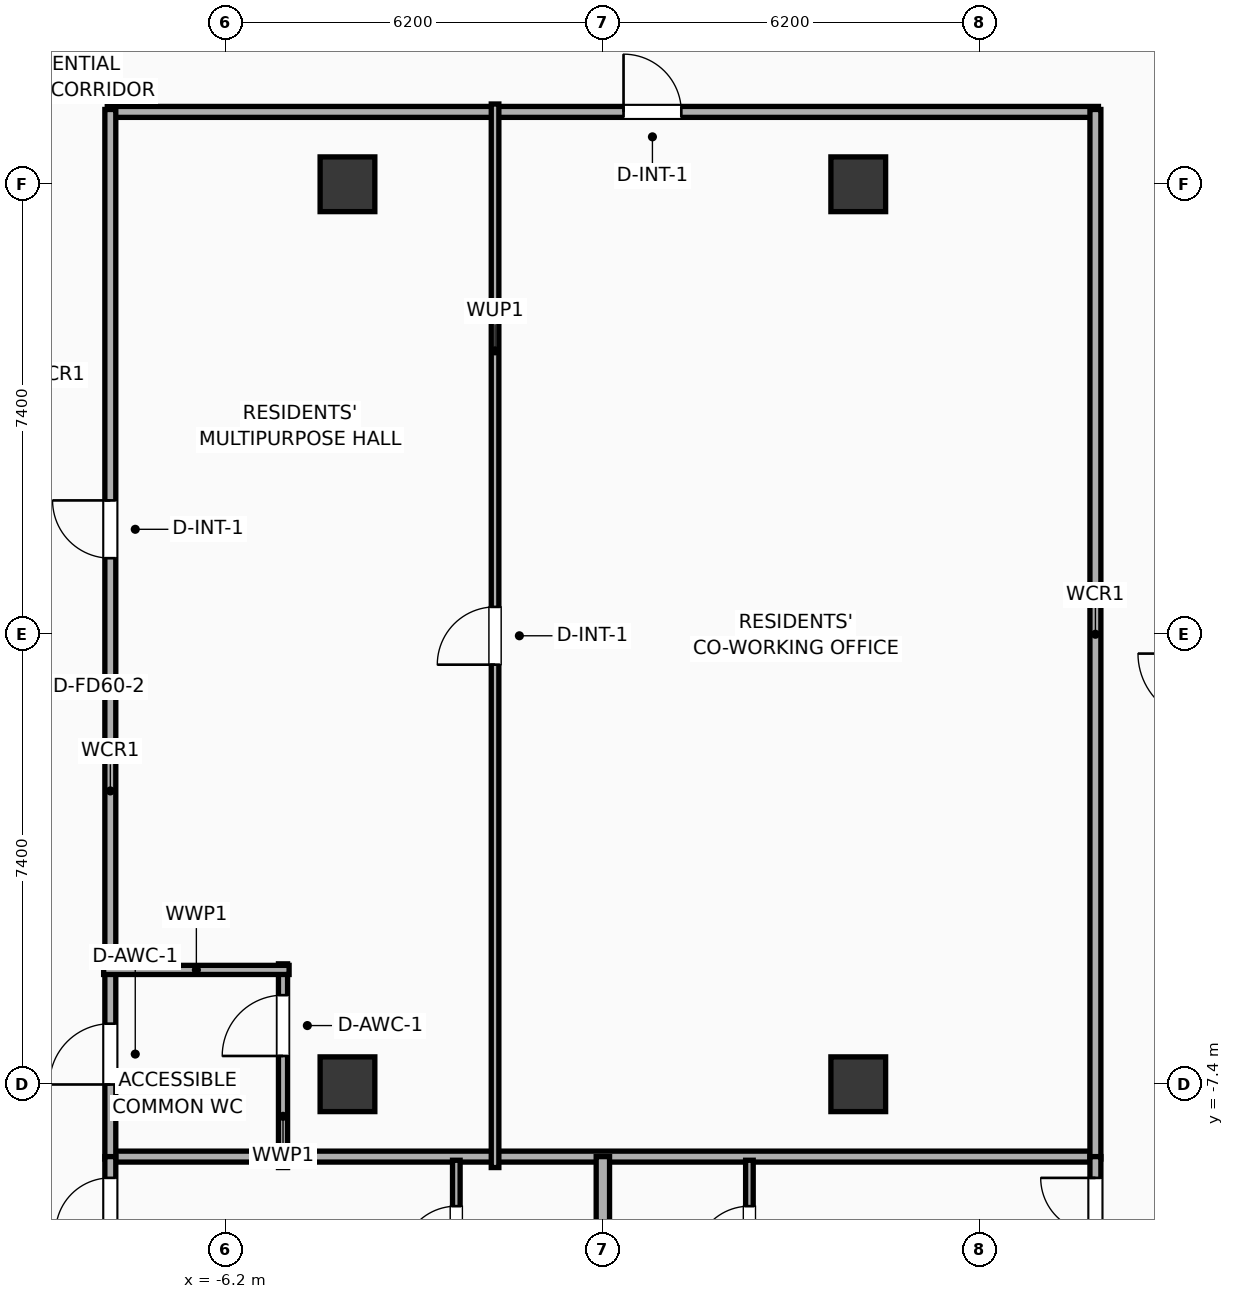
"""IFC4 building model, lengths in metres.
Left out: names, types, materials, properties, quantities, classifications, styles, units other than length and angle.
Written with IfcOpenShell. Run it as: python <this file> out.ifc"""

import sys

from ifc_helpers import new_model, si_unit, direction, frame, frame_2d, origin, origin_2d, place, context, subcontext, project, spatial, rectangle, extrude, element, fill, save


model = new_model("IFC4")
c1 = context("Model", 3, precision=1e-05, world=origin(), true_north=direction((0.0, 1.0)))
c2 = subcontext(c1, "Body", "Model", "MODEL_VIEW")
j1 = project(units=[si_unit("LENGTHUNIT", "METRE"), si_unit("PLANEANGLEUNIT", "RADIAN")], contexts=[c1])
p1 = place(None, origin())
s1 = spatial("IfcSite", under=j1, at=p1, CompositionType="ELEMENT")
p2 = place(p1, origin())
s2 = spatial("IfcBuilding", under=s1, at=p2, CompositionType="ELEMENT")
p3 = place(p2, frame((0.0, 0.0, 295.1)))
s3 = spatial("IfcBuildingStorey", under=s2, at=p3, CompositionType="ELEMENT", Elevation=295.1)
for number, where, z_axis, x_axis in (
    (1, (-4.2, -7.4, 0.0), (0.0, 0.0, 1.0), (1.0, 0.0, 0.0)),
    (2, (-4.2, 7.4, 0.0), (0.0, 0.0, 1.0), (1.0, 0.0, 0.0)),
    (3, (4.2, -7.4, 0.0), (0.0, 0.0, 1.0), (1.0, 0.0, 0.0)),
    (4, (4.2, 7.4, 0.0), (0.0, 0.0, 1.0), (1.0, 0.0, 0.0)),
):
    element("IfcColumn", number, at=place(p3, frame(where, z_axis=z_axis, x_axis=x_axis)), inside=s3, PredefinedType="COLUMN", context=c2, shape_type="SweptSolid", body=[
        extrude(rectangle(XDim=0.9, YDim=0.9, at=origin_2d()), origin(), (0.0, 0.0, 1.0), 3.9),
    ])
p4 = place(p3, frame((-8.15, 8.59, 0.0), z_axis=(0.0, 0.0, 1.0), x_axis=(1.0, 0.0, 0.0)))
e5 = element("IfcWall", 5, at=p4, inside=s3, PredefinedType="PARTITIONING", context=c2, shape_type="SweptSolid", body=[
    extrude(rectangle(XDim=16.3, YDim=0.18, at=frame_2d((8.15, 0.0))), origin(), (0.0, 0.0, 1.0), 3.635),
])
p5 = place(p4, frame((8.49, 0.0, 0.0)))
e6 = element("IfcOpeningElement", 6, at=p5, cuts=e5, PredefinedType="OPENING", context=c2, shape_type="SweptSolid", body=[
    extrude(rectangle(XDim=0.95, YDim=2.05, at=frame_2d((0.475, 1.025))), frame((0.0, 0.1, 0.0), z_axis=(0.0, -1.0, 0.0), x_axis=(1.0, 0.0, 0.0)), (0.0, 0.0, 1.0), 0.2),
])
p6 = place(p3, frame((-8.15, -8.59, 0.0), z_axis=(0.0, 0.0, 1.0), x_axis=(1.0, 0.0, 0.0)))
e7 = element("IfcWall", 7, at=p6, inside=s3, PredefinedType="PARTITIONING", context=c2, shape_type="SweptSolid", body=[
    extrude(rectangle(XDim=16.3, YDim=0.18, at=frame_2d((8.15, 0.0))), origin(), (0.0, 0.0, 1.0), 3.635),
])
p7 = place(p3, frame((-8.1, -8.63, 0.0), z_axis=(0.0, 0.0, 1.0), x_axis=(0.0, 1.0, 0.0)))
e8 = element("IfcWall", 8, at=p7, inside=s3, PredefinedType="PARTITIONING", context=c2, shape_type="SweptSolid", body=[
    extrude(rectangle(XDim=17.26, YDim=0.18, at=frame_2d((8.63, 0.0))), origin(), (0.0, 0.0, 1.0), 3.635),
])
p8 = place(p7, frame((1.226, 0.0, 0.0)))
e9 = element("IfcOpeningElement", 9, at=p8, cuts=e8, PredefinedType="OPENING", context=c2, shape_type="SweptSolid", body=[
    extrude(rectangle(XDim=1.0, YDim=2.05, at=frame_2d((0.5, 1.025))), frame((0.0, 0.1, 0.0), z_axis=(0.0, -1.0, 0.0), x_axis=(1.0, 0.0, 0.0)), (0.0, 0.0, 1.0), 0.2),
])
p9 = place(p7, frame((9.881, 0.0, 0.0)))
e10 = element("IfcOpeningElement", 10, at=p9, cuts=e8, PredefinedType="OPENING", context=c2, shape_type="SweptSolid", body=[
    extrude(rectangle(XDim=0.95, YDim=2.05, at=frame_2d((0.475, 1.025))), frame((0.0, 0.1, 0.0), z_axis=(0.0, -1.0, 0.0), x_axis=(1.0, 0.0, 0.0)), (0.0, 0.0, 1.0), 0.2),
])
p10 = place(p3, frame((8.1, -8.63, 0.0), z_axis=(0.0, 0.0, 1.0), x_axis=(0.0, 1.0, 0.0)))
e11 = element("IfcWall", 11, at=p10, inside=s3, PredefinedType="PARTITIONING", context=c2, shape_type="SweptSolid", body=[
    extrude(rectangle(XDim=17.26, YDim=0.18, at=frame_2d((8.63, 0.0))), origin(), (0.0, 0.0, 1.0), 3.635),
])
p11 = place(p3, frame((-5.26, -8.77, 0.0), z_axis=(0.0, 0.0, 1.0), x_axis=(0.0, 1.0, 0.0)))
e12 = element("IfcWall", 12, at=p11, inside=s3, PredefinedType="PLUMBINGWALL", context=c2, shape_type="SweptSolid", body=[
    extrude(rectangle(XDim=3.35, YDim=0.15, at=frame_2d((1.675, 0.0))), origin(), (0.0, 0.0, 1.0), 3.635),
])
p12 = place(p11, frame((1.835, 0.0, 0.0)))
e13 = element("IfcOpeningElement", 13, at=p12, cuts=e12, PredefinedType="OPENING", context=c2, shape_type="SweptSolid", body=[
    extrude(rectangle(XDim=1.0, YDim=2.05, at=frame_2d((0.5, 1.025))), frame((0.0, 0.085, 0.0), z_axis=(0.0, -1.0, 0.0), x_axis=(1.0, 0.0, 0.0)), (0.0, 0.0, 1.0), 0.17),
])
p13 = place(p3, frame((-8.21, -5.52, 0.0), z_axis=(0.0, 0.0, 1.0), x_axis=(1.0, 0.0, 0.0)))
e14 = element("IfcWall", 14, at=p13, inside=s3, PredefinedType="PLUMBINGWALL", context=c2, shape_type="SweptSolid", body=[
    extrude(rectangle(XDim=3.05, YDim=0.15, at=frame_2d((1.525, 0.0))), origin(), (0.0, 0.0, 1.0), 3.635),
])
p14 = place(p3, frame((-1.773, -8.77, 0.0), z_axis=(0.0, 0.0, 1.0), x_axis=(0.0, 1.0, 0.0)))
e15 = element("IfcWall", 15, at=p14, inside=s3, PredefinedType="PARTITIONING", context=c2, shape_type="SweptSolid", body=[
    extrude(rectangle(XDim=17.49, YDim=0.125, at=frame_2d((8.745, 0.0))), origin(), (0.0, 0.0, 1.0), 3.635),
])
p15 = place(p14, frame((8.27, 0.0, 0.0)))
e16 = element("IfcOpeningElement", 16, at=p15, cuts=e15, PredefinedType="OPENING", context=c2, shape_type="SweptSolid", body=[
    extrude(rectangle(XDim=0.95, YDim=2.05, at=frame_2d((0.475, 1.025))), frame((0.0, 0.073, 0.0), z_axis=(0.0, -1.0, 0.0), x_axis=(1.0, 0.0, 0.0)), (0.0, 0.0, 1.0), 0.145),
])
p16 = place(p3, frame((-2.41, -11.06, 0.0), z_axis=(0.0, 0.0, 1.0), x_axis=(0.0, 1.0, 0.0)))
e17 = element("IfcWall", 17, at=p16, inside=s3, PredefinedType="PARTITIONING", context=c2, shape_type="SweptSolid", body=[
    extrude(rectangle(XDim=2.41, YDim=0.125, at=frame_2d((1.205, 0.0))), origin(), (0.0, 0.0, 1.0), 3.635),
])
p17 = place(p16, frame((0.755, 0.0, 0.0)))
e18 = element("IfcOpeningElement", 18, at=p17, cuts=e17, PredefinedType="OPENING", context=c2, shape_type="SweptSolid", body=[
    extrude(rectangle(XDim=0.9, YDim=2.05, at=frame_2d((0.45, 1.025))), frame((0.0, 0.073, 0.0), z_axis=(0.0, -1.0, 0.0), x_axis=(1.0, 0.0, 0.0)), (0.0, 0.0, 1.0), 0.145),
])
p18 = place(p3, frame((-8.1, -18.155, 0.0), z_axis=(0.0, 0.0, 1.0), x_axis=(0.0, 1.0, 0.0)))
e19 = element("IfcWall", 19, at=p18, inside=s3, PredefinedType="PARTITIONING", context=c2, shape_type="SweptSolid", body=[
    extrude(rectangle(XDim=9.564, YDim=0.18, at=frame_2d((4.782, 0.0))), origin(), (0.0, 0.0, 1.0), 3.635),
])
p19 = place(p18, frame((8.315, 0.0, 0.0)))
e20 = element("IfcOpeningElement", 20, at=p19, cuts=e19, PredefinedType="OPENING", context=c2, shape_type="SweptSolid", body=[
    extrude(rectangle(XDim=0.9, YDim=2.05, at=frame_2d((0.45, 1.025))), frame((0.0, 0.1, 0.0), z_axis=(0.0, -1.0, 0.0), x_axis=(1.0, 0.0, 0.0)), (0.0, 0.0, 1.0), 0.2),
])
p20 = place(p3, frame((2.41, -11.06, 0.0), z_axis=(0.0, 0.0, 1.0), x_axis=(0.0, 1.0, 0.0)))
e21 = element("IfcWall", 21, at=p20, inside=s3, PredefinedType="PARTITIONING", context=c2, shape_type="SweptSolid", body=[
    extrude(rectangle(XDim=2.41, YDim=0.125, at=frame_2d((1.205, 0.0))), origin(), (0.0, 0.0, 1.0), 3.635),
])
p21 = place(p20, frame((0.755, 0.0, 0.0)))
e22 = element("IfcOpeningElement", 22, at=p21, cuts=e21, PredefinedType="OPENING", context=c2, shape_type="SweptSolid", body=[
    extrude(rectangle(XDim=0.9, YDim=2.05, at=frame_2d((0.45, 1.025))), frame((0.0, 0.073, 0.0), z_axis=(0.0, -1.0, 0.0), x_axis=(1.0, 0.0, 0.0)), (0.0, 0.0, 1.0), 0.145),
])
p22 = place(p3, frame((8.1, -19.857, 0.0), z_axis=(0.0, 0.0, 1.0), x_axis=(0.0, 1.0, 0.0)))
e23 = element("IfcWall", 23, at=p22, inside=s3, PredefinedType="PARTITIONING", context=c2, shape_type="SweptSolid", body=[
    extrude(rectangle(XDim=11.267, YDim=0.18, at=frame_2d((5.634, 0.0))), origin(), (0.0, 0.0, 1.0), 3.635),
])
p23 = place(p22, frame((10.017, 0.0, 0.0)))
e24 = element("IfcOpeningElement", 24, at=p23, cuts=e23, PredefinedType="OPENING", context=c2, shape_type="SweptSolid", body=[
    extrude(rectangle(XDim=0.9, YDim=2.05, at=frame_2d((0.45, 1.025))), frame((0.0, 0.1, 0.0), z_axis=(0.0, -1.0, 0.0), x_axis=(1.0, 0.0, 0.0)), (0.0, 0.0, 1.0), 0.2),
])
p24 = place(p3, frame((0.0, -19.006, 0.0), z_axis=(0.0, 0.0, 1.0), x_axis=(0.0, 1.0, 0.0)))
e25 = element("IfcWall", 25, at=p24, inside=s3, PredefinedType="PARTITIONING", context=c2, shape_type="SweptSolid", body=[
    extrude(rectangle(XDim=10.416, YDim=0.22, at=frame_2d((5.208, 0.0))), origin(), (0.0, 0.0, 1.0), 3.635),
])
p25 = place(p5, origin())
e26 = element("IfcDoor", 26, at=p25, inside=s3, OperationType="SINGLE_SWING_LEFT", PredefinedType="DOOR", context=c2, shape_type="SweptSolid", body=[
    extrude(rectangle(XDim=0.95, YDim=2.05, at=frame_2d((0.475, 1.025))), frame((0.0, 0.025, 0.0), z_axis=(0.0, -1.0, 0.0), x_axis=(1.0, 0.0, 0.0)), (0.0, 0.0, 1.0), 0.05),
])
fill(e6, e26)
p26 = place(p8, origin())
e27 = element("IfcDoor", 27, at=p26, inside=s3, OperationType="SINGLE_SWING_LEFT", PredefinedType="DOOR", context=c2, shape_type="SweptSolid", body=[
    extrude(rectangle(XDim=1.0, YDim=2.05, at=frame_2d((0.5, 1.025))), frame((0.0, 0.025, 0.0), z_axis=(0.0, -1.0, 0.0), x_axis=(1.0, 0.0, 0.0)), (0.0, 0.0, 1.0), 0.05),
])
fill(e9, e27)
p27 = place(p9, origin())
e28 = element("IfcDoor", 28, at=p27, inside=s3, OperationType="SINGLE_SWING_RIGHT", PredefinedType="DOOR", context=c2, shape_type="SweptSolid", body=[
    extrude(rectangle(XDim=0.95, YDim=2.05, at=frame_2d((0.475, 1.025))), frame((0.0, 0.025, 0.0), z_axis=(0.0, -1.0, 0.0), x_axis=(1.0, 0.0, 0.0)), (0.0, 0.0, 1.0), 0.05),
])
fill(e10, e28)
p28 = place(p12, origin())
e29 = element("IfcDoor", 29, at=p28, inside=s3, OperationType="SINGLE_SWING_LEFT", PredefinedType="DOOR", context=c2, shape_type="SweptSolid", body=[
    extrude(rectangle(XDim=1.0, YDim=2.05, at=frame_2d((0.5, 1.025))), frame((0.0, 0.025, 0.0), z_axis=(0.0, -1.0, 0.0), x_axis=(1.0, 0.0, 0.0)), (0.0, 0.0, 1.0), 0.05),
])
fill(e13, e29)
p29 = place(p15, origin())
e30 = element("IfcDoor", 30, at=p29, inside=s3, OperationType="SINGLE_SWING_LEFT", PredefinedType="DOOR", context=c2, shape_type="SweptSolid", body=[
    extrude(rectangle(XDim=0.95, YDim=2.05, at=frame_2d((0.475, 1.025))), frame((0.0, 0.025, 0.0), z_axis=(0.0, -1.0, 0.0), x_axis=(1.0, 0.0, 0.0)), (0.0, 0.0, 1.0), 0.05),
])
fill(e16, e30)
p30 = place(p17, origin())
e31 = element("IfcDoor", 31, at=p30, inside=s3, OperationType="SINGLE_SWING_LEFT", PredefinedType="DOOR", context=c2, shape_type="SweptSolid", body=[
    extrude(rectangle(XDim=0.9, YDim=2.05, at=frame_2d((0.45, 1.025))), frame((0.0, 0.025, 0.0), z_axis=(0.0, -1.0, 0.0), x_axis=(1.0, 0.0, 0.0)), (0.0, 0.0, 1.0), 0.05),
])
fill(e18, e31)
p31 = place(p19, origin())
e32 = element("IfcDoor", 32, at=p31, inside=s3, OperationType="SINGLE_SWING_LEFT", PredefinedType="DOOR", context=c2, shape_type="SweptSolid", body=[
    extrude(rectangle(XDim=0.9, YDim=2.05, at=frame_2d((0.45, 1.025))), frame((0.0, 0.025, 0.0), z_axis=(0.0, -1.0, 0.0), x_axis=(1.0, 0.0, 0.0)), (0.0, 0.0, 1.0), 0.05),
])
fill(e20, e32)
p32 = place(p21, origin())
e33 = element("IfcDoor", 33, at=p32, inside=s3, OperationType="SINGLE_SWING_LEFT", PredefinedType="DOOR", context=c2, shape_type="SweptSolid", body=[
    extrude(rectangle(XDim=0.9, YDim=2.05, at=frame_2d((0.45, 1.025))), frame((0.0, 0.025, 0.0), z_axis=(0.0, -1.0, 0.0), x_axis=(1.0, 0.0, 0.0)), (0.0, 0.0, 1.0), 0.05),
])
fill(e22, e33)
p33 = place(p23, origin())
e34 = element("IfcDoor", 34, at=p33, inside=s3, OperationType="SINGLE_SWING_RIGHT", PredefinedType="DOOR", context=c2, shape_type="SweptSolid", body=[
    extrude(rectangle(XDim=0.9, YDim=2.05, at=frame_2d((0.45, 1.025))), frame((0.0, 0.025, 0.0), z_axis=(0.0, -1.0, 0.0), x_axis=(1.0, 0.0, 0.0)), (0.0, 0.0, 1.0), 0.05),
])
fill(e24, e34)
save(model, sys.argv[1])
